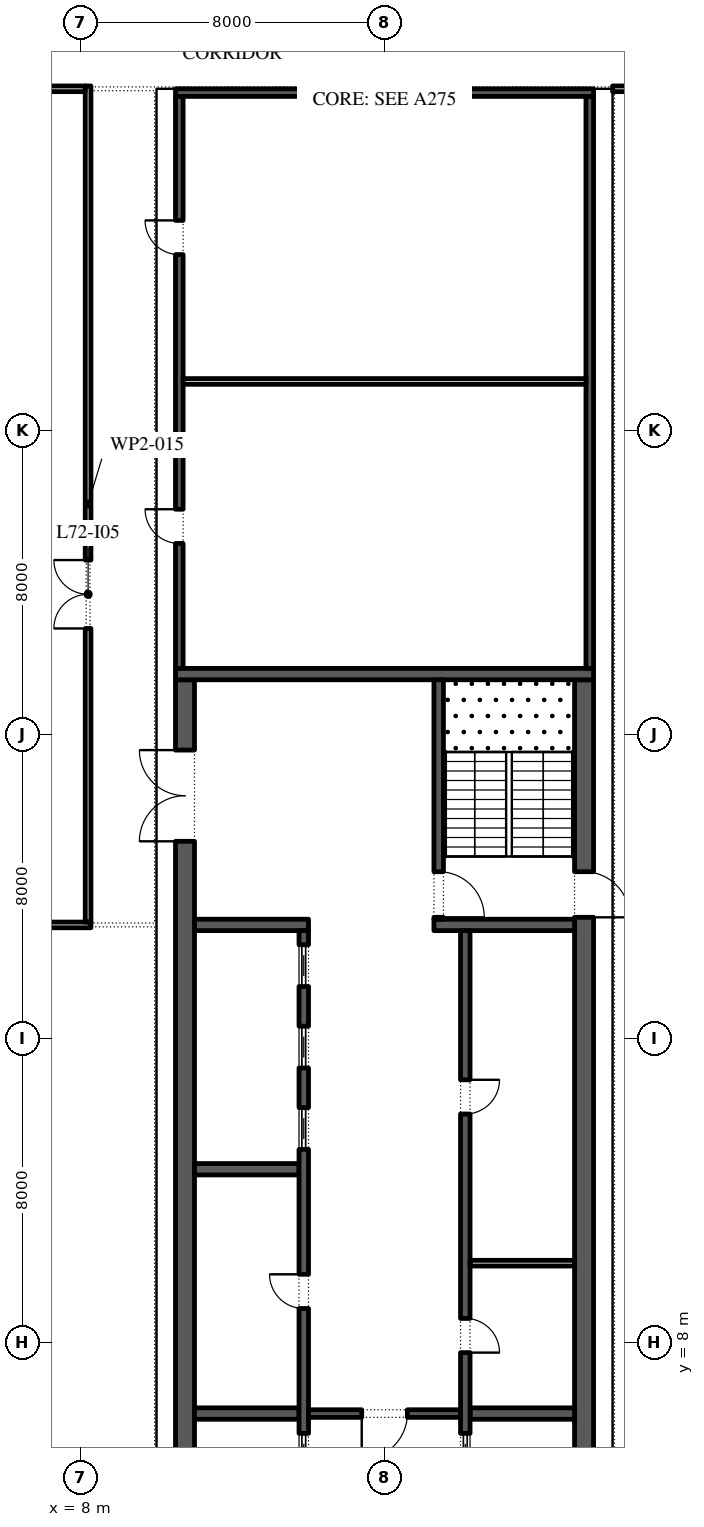
"""IFC4 building model, lengths in metres.
Left out: names, types, materials, properties, quantities, classifications, styles, units other than length and angle.
Written with IfcOpenShell. Run it as: python <this file> out.ifc"""

import sys

from ifc_helpers import new_model, si_unit, direction, frame, frame_2d, origin, place, context, subcontext, project, spatial, rectangle, extrude, element, fill, save


model = new_model("IFC4")
c1 = context("Model", 3, precision=1e-05, world=origin(), true_north=direction((0.0, 1.0)))
c2 = subcontext(c1, "Body", "Model", "MODEL_VIEW")
j1 = project(units=[si_unit("LENGTHUNIT", "METRE"), si_unit("PLANEANGLEUNIT", "RADIAN")], contexts=[c1])
p1 = place(None, origin())
s1 = spatial("IfcSite", under=j1, at=p1, CompositionType="ELEMENT")
p2 = place(p1, origin())
s2 = spatial("IfcBuilding", under=s1, at=p2, CompositionType="ELEMENT")
p3 = place(p2, frame((0.0, 0.0, 330.0)))
s3 = spatial("IfcBuildingStorey", under=s2, at=p3, CompositionType="ELEMENT", Elevation=330.0)
p4 = place(p3, frame((21.25, -2.45, 0.0), z_axis=(0.0, 0.0, 1.0), x_axis=(0.0, 1.0, 0.0)))
e1 = element("IfcWall", 1, at=p4, inside=s3, PredefinedType="SHEAR", context=c2, shape_type="SweptSolid", body=[
    extrude(rectangle(XDim=27.9, YDim=0.5, at=frame_2d((13.95, 0.0))), origin(), (0.0, 0.0, 1.0), 4.0),
])
p5 = place(p4, frame((5.05, 0.0, 0.0)))
e2 = element("IfcOpeningElement", 2, at=p5, cuts=e1, PredefinedType="OPENING", context=c2, shape_type="SweptSolid", body=[
    extrude(rectangle(XDim=1.2, YDim=2.1, at=frame_2d((0.6, 1.05))), frame((0.0, 0.26, 0.0), z_axis=(0.0, -1.0, 0.0), x_axis=(1.0, 0.0, 0.0)), (0.0, 0.0, 1.0), 0.52),
])
p6 = place(p4, frame((21.65, 0.0, 0.0)))
e3 = element("IfcOpeningElement", 3, at=p6, cuts=e1, PredefinedType="OPENING", context=c2, shape_type="SweptSolid", body=[
    extrude(rectangle(XDim=1.2, YDim=2.1, at=frame_2d((0.6, 1.05))), frame((0.0, 0.26, 0.0), z_axis=(0.0, -1.0, 0.0), x_axis=(1.0, 0.0, 0.0)), (0.0, 0.0, 1.0), 0.52),
])
p7 = place(p3, frame((10.75, -2.45, 0.0), z_axis=(0.0, 0.0, 1.0), x_axis=(0.0, 1.0, 0.0)))
e4 = element("IfcWall", 4, at=p7, inside=s3, PredefinedType="SHEAR", context=c2, shape_type="SweptSolid", body=[
    extrude(rectangle(XDim=27.9, YDim=0.5, at=frame_2d((13.95, 0.0))), origin(), (0.0, 0.0, 1.0), 4.0),
])
p8 = place(p7, frame((23.65, 0.0, 0.0)))
e5 = element("IfcOpeningElement", 5, at=p8, cuts=e4, PredefinedType="OPENING", context=c2, shape_type="SweptSolid", body=[
    extrude(rectangle(XDim=2.4, YDim=2.1, at=frame_2d((1.2, 1.05))), frame((0.0, 0.26, 0.0), z_axis=(0.0, -1.0, 0.0), x_axis=(1.0, 0.0, 0.0)), (0.0, 0.0, 1.0), 0.52),
])
p9 = place(p7, frame((1.087, 0.0, 0.0)))
e6 = element("IfcOpeningElement", 6, at=p9, cuts=e4, PredefinedType="OPENING", context=c2, shape_type="SweptSolid", body=[
    extrude(rectangle(XDim=0.9, YDim=2.1, at=frame_2d((0.45, 1.05))), frame((0.0, 0.26, 0.0), z_axis=(0.0, -1.0, 0.0), x_axis=(1.0, 0.0, 0.0)), (0.0, 0.0, 1.0), 0.52),
])
p10 = place(p7, frame((4.262, 0.0, 0.0)))
e7 = element("IfcOpeningElement", 7, at=p10, cuts=e4, PredefinedType="OPENING", context=c2, shape_type="SweptSolid", body=[
    extrude(rectangle(XDim=1.0, YDim=2.1, at=frame_2d((0.5, 1.05))), frame((0.0, 0.26, 0.0), z_axis=(0.0, -1.0, 0.0), x_axis=(1.0, 0.0, 0.0)), (0.0, 0.0, 1.0), 0.52),
])
p11 = place(p3, frame((10.5, 25.6, 0.0), z_axis=(0.0, 0.0, 1.0), x_axis=(1.0, 0.0, 0.0)))
e8 = element("IfcWall", 8, at=p11, inside=s3, PredefinedType="SHEAR", context=c2, shape_type="SweptSolid", body=[
    extrude(rectangle(XDim=11.0, YDim=0.3, at=frame_2d((5.5, 0.0))), origin(), (0.0, 0.0, 1.0), 4.0),
])
p12 = place(p3, frame((17.3, 19.0, 0.0), z_axis=(0.0, 0.0, 1.0), x_axis=(1.0, 0.0, 0.0)))
e9 = element("IfcWall", 9, at=p12, inside=s3, PredefinedType="SHEAR", context=c2, shape_type="SweptSolid", body=[
    extrude(rectangle(XDim=3.7, YDim=0.3, at=frame_2d((1.85, 0.0))), origin(), (0.0, 0.0, 1.0), 4.0),
])
p13 = place(p3, frame((17.425, 19.15, 0.0), z_axis=(0.0, 0.0, 1.0), x_axis=(0.0, 1.0, 0.0)))
e10 = element("IfcWall", 10, at=p13, inside=s3, PredefinedType="SHEAR", context=c2, shape_type="SweptSolid", body=[
    extrude(rectangle(XDim=6.3, YDim=0.25, at=frame_2d((3.15, 0.0))), origin(), (0.0, 0.0, 1.0), 4.0),
])
p14 = place(p13, frame((0.05, 0.0, 0.0)))
e11 = element("IfcOpeningElement", 11, at=p14, cuts=e10, PredefinedType="OPENING", context=c2, shape_type="SweptSolid", body=[
    extrude(rectangle(XDim=1.2, YDim=2.1, at=frame_2d((0.6, 1.05))), frame((0.0, 0.135, 0.0), z_axis=(0.0, -1.0, 0.0), x_axis=(1.0, 0.0, 0.0)), (0.0, 0.0, 1.0), 0.27),
])
p15 = place(p3, frame((18.25, 6.143, 0.0), z_axis=(0.0, 0.0, 1.0), x_axis=(1.0, 0.0, 0.0)))
e12 = element("IfcWall", 12, at=p15, inside=s3, PredefinedType="SHEAR", context=c2, shape_type="SweptSolid", body=[
    extrude(rectangle(XDim=2.75, YDim=0.3, at=frame_2d((1.375, 0.0))), origin(), (0.0, 0.0, 1.0), 4.0),
])
p16 = place(p3, frame((18.125, 4.15, 0.0), z_axis=(0.0, 0.0, 1.0), x_axis=(0.0, 1.0, 0.0)))
e13 = element("IfcWall", 13, at=p16, inside=s3, PredefinedType="SHEAR", context=c2, shape_type="SweptSolid", body=[
    extrude(rectangle(XDim=14.7, YDim=0.25, at=frame_2d((7.35, 0.0))), origin(), (0.0, 0.0, 1.0), 4.0),
])
p17 = place(p16, frame((3.596, 0.0, 0.0)))
e14 = element("IfcOpeningElement", 14, at=p17, cuts=e13, PredefinedType="OPENING", context=c2, shape_type="SweptSolid", body=[
    extrude(rectangle(XDim=0.9, YDim=2.1, at=frame_2d((0.45, 1.05))), frame((0.0, 0.135, 0.0), z_axis=(0.0, -1.0, 0.0), x_axis=(1.0, 0.0, 0.0)), (0.0, 0.0, 1.0), 0.27),
])
p18 = place(p16, frame((9.875, 0.0, 0.0)))
e15 = element("IfcOpeningElement", 15, at=p18, cuts=e13, PredefinedType="OPENING", context=c2, shape_type="SweptSolid", body=[
    extrude(rectangle(XDim=0.9, YDim=2.1, at=frame_2d((0.45, 1.05))), frame((0.0, 0.135, 0.0), z_axis=(0.0, -1.0, 0.0), x_axis=(1.0, 0.0, 0.0)), (0.0, 0.0, 1.0), 0.27),
])
p19 = place(p16, frame((0.371, 0.0, 0.0)))
e16 = element("IfcOpeningElement", 16, at=p19, cuts=e13, PredefinedType="OPENING", context=c2, shape_type="SweptSolid", body=[
    extrude(rectangle(XDim=1.1, YDim=2.1, at=frame_2d((0.55, 1.05))), frame((0.0, 0.135, 0.0), z_axis=(0.0, -1.0, 0.0), x_axis=(1.0, 0.0, 0.0)), (0.0, 0.0, 1.0), 0.27),
])
p20 = place(p3, frame((18.25, 10.1, 0.0), z_axis=(0.0, 0.0, 1.0), x_axis=(1.0, 0.0, 0.0)))
e17 = element("IfcWall", 17, at=p20, inside=s3, PredefinedType="PARTITIONING", context=c2, shape_type="SweptSolid", body=[
    extrude(rectangle(XDim=2.75, YDim=0.15, at=frame_2d((1.375, 0.0))), origin(), (0.0, 0.0, 1.0), 4.0),
])
for number, where, z_axis, x_axis in (
    (18, (11.0, 6.143, 0.0), (0.0, 0.0, 1.0), (1.0, 0.0, 0.0)),
    (19, (11.0, 12.571, 0.0), (0.0, 0.0, 1.0), (1.0, 0.0, 0.0)),
):
    element("IfcWall", number, at=place(p3, frame(where, z_axis=z_axis, x_axis=x_axis)), inside=s3, PredefinedType="SHEAR", context=c2, shape_type="SweptSolid", body=[
        extrude(rectangle(XDim=2.75, YDim=0.3, at=frame_2d((1.375, 0.0))), origin(), (0.0, 0.0, 1.0), 4.0),
    ])
p21 = place(p3, frame((11.0, 19.0, 0.0), z_axis=(0.0, 0.0, 1.0), x_axis=(1.0, 0.0, 0.0)))
e20 = element("IfcWall", 20, at=p21, inside=s3, PredefinedType="SHEAR", context=c2, shape_type="SweptSolid", body=[
    extrude(rectangle(XDim=3.0, YDim=0.3, at=frame_2d((1.5, 0.0))), origin(), (0.0, 0.0, 1.0), 4.0),
])
p22 = place(p3, frame((13.875, -2.45, 0.0), z_axis=(0.0, 0.0, 1.0), x_axis=(0.0, 1.0, 0.0)))
e21 = element("IfcWall", 21, at=p22, inside=s3, PredefinedType="SHEAR", context=c2, shape_type="SweptSolid", body=[
    extrude(rectangle(XDim=21.3, YDim=0.25, at=frame_2d((10.65, 0.0))), origin(), (0.0, 0.0, 1.0), 4.0),
])
p23 = place(p22, frame((11.357, 0.0, 0.0)))
e22 = element("IfcOpeningElement", 22, at=p23, cuts=e21, PredefinedType="OPENING", context=c2, shape_type="SweptSolid", body=[
    extrude(rectangle(XDim=0.9, YDim=2.1, at=frame_2d((0.45, 1.05))), frame((0.0, 0.135, 0.0), z_axis=(0.0, -1.0, 0.0), x_axis=(1.0, 0.0, 0.0)), (0.0, 0.0, 1.0), 0.27),
])
p24 = place(p22, frame((6.971, 0.0, 0.0)))
e23 = element("IfcOpeningElement", 23, at=p24, cuts=e21, PredefinedType="OPENING", context=c2, shape_type="SweptSolid", body=[
    extrude(rectangle(XDim=1.1, YDim=2.1, at=frame_2d((0.55, 1.05))), frame((0.0, 0.135, 0.0), z_axis=(0.0, -1.0, 0.0), x_axis=(1.0, 0.0, 0.0)), (0.0, 0.0, 1.0), 0.27),
])
p25 = place(p22, frame((15.543, 0.0, 0.0)))
e24 = element("IfcOpeningElement", 24, at=p25, cuts=e21, PredefinedType="OPENING", context=c2, shape_type="SweptSolid", body=[
    extrude(rectangle(XDim=1.1, YDim=2.1, at=frame_2d((0.55, 1.05))), frame((0.0, 0.135, 0.0), z_axis=(0.0, -1.0, 0.0), x_axis=(1.0, 0.0, 0.0)), (0.0, 0.0, 1.0), 0.27),
])
p26 = place(p22, frame((17.686, 0.0, 0.0)))
e25 = element("IfcOpeningElement", 25, at=p26, cuts=e21, PredefinedType="OPENING", context=c2, shape_type="SweptSolid", body=[
    extrude(rectangle(XDim=1.1, YDim=2.1, at=frame_2d((0.55, 1.05))), frame((0.0, 0.135, 0.0), z_axis=(0.0, -1.0, 0.0), x_axis=(1.0, 0.0, 0.0)), (0.0, 0.0, 1.0), 0.27),
])
p27 = place(p22, frame((19.829, 0.0, 0.0)))
e26 = element("IfcOpeningElement", 26, at=p27, cuts=e21, PredefinedType="OPENING", context=c2, shape_type="SweptSolid", body=[
    extrude(rectangle(XDim=1.1, YDim=2.1, at=frame_2d((0.55, 1.05))), frame((0.0, 0.135, 0.0), z_axis=(0.0, -1.0, 0.0), x_axis=(1.0, 0.0, 0.0)), (0.0, 0.0, 1.0), 0.27),
])
p28 = place(p3, frame((14.0, 6.143, 0.0), z_axis=(0.0, 0.0, 1.0), x_axis=(1.0, 0.0, 0.0)))
e27 = element("IfcWall", 27, at=p28, inside=s3, PredefinedType="SHEAR", context=c2, shape_type="SweptSolid", body=[
    extrude(rectangle(XDim=4.0, YDim=0.2, at=frame_2d((2.0, 0.0))), origin(), (0.0, 0.0, 1.0), 4.0),
])
p29 = place(p28, frame((1.4, 0.0, 0.0)))
e28 = element("IfcOpeningElement", 28, at=p29, cuts=e27, PredefinedType="OPENING", context=c2, shape_type="SweptSolid", body=[
    extrude(rectangle(XDim=1.2, YDim=2.1, at=frame_2d((0.6, 1.05))), frame((0.0, 0.11, 0.0), z_axis=(0.0, -1.0, 0.0), x_axis=(1.0, 0.0, 0.0)), (0.0, 0.0, 1.0), 0.22),
])
p30 = place(p3, frame((21.4, 25.75, 0.0), z_axis=(0.0, 0.0, 1.0), x_axis=(0.0, 1.0, 0.0)))
e29 = element("IfcWall", 29, at=p30, inside=s3, PredefinedType="SHEAR", context=c2, shape_type="SweptSolid", body=[
    extrude(rectangle(XDim=15.05, YDim=0.2, at=frame_2d((7.525, 0.0))), origin(), (0.0, 0.0, 1.0), 4.0),
])
p31 = place(p3, frame((10.6, 25.75, 0.0), z_axis=(0.0, 0.0, 1.0), x_axis=(0.0, 1.0, 0.0)))
e30 = element("IfcWall", 30, at=p31, inside=s3, PredefinedType="SHEAR", context=c2, shape_type="SweptSolid", body=[
    extrude(rectangle(XDim=15.05, YDim=0.2, at=frame_2d((7.525, 0.0))), origin(), (0.0, 0.0, 1.0), 4.0),
])
p32 = place(p31, frame((3.288, 0.0, 0.0)))
e31 = element("IfcOpeningElement", 31, at=p32, cuts=e30, PredefinedType="OPENING", context=c2, shape_type="SweptSolid", body=[
    extrude(rectangle(XDim=0.9, YDim=2.1, at=frame_2d((0.45, 1.05))), frame((0.0, 0.11, 0.0), z_axis=(0.0, -1.0, 0.0), x_axis=(1.0, 0.0, 0.0)), (0.0, 0.0, 1.0), 0.22),
])
p33 = place(p31, frame((10.887, 0.0, 0.0)))
e32 = element("IfcOpeningElement", 32, at=p33, cuts=e30, PredefinedType="OPENING", context=c2, shape_type="SweptSolid", body=[
    extrude(rectangle(XDim=0.9, YDim=2.1, at=frame_2d((0.45, 1.05))), frame((0.0, 0.11, 0.0), z_axis=(0.0, -1.0, 0.0), x_axis=(1.0, 0.0, 0.0)), (0.0, 0.0, 1.0), 0.22),
])
p34 = place(p3, frame((10.5, 40.9, 0.0), z_axis=(0.0, 0.0, 1.0), x_axis=(1.0, 0.0, 0.0)))
e33 = element("IfcWall", 33, at=p34, inside=s3, PredefinedType="SHEAR", context=c2, shape_type="SweptSolid", body=[
    extrude(rectangle(XDim=11.0, YDim=0.2, at=frame_2d((5.5, 0.0))), origin(), (0.0, 0.0, 1.0), 4.0),
])
p35 = place(p3, frame((10.7, 33.3, 0.0), z_axis=(0.0, 0.0, 1.0), x_axis=(1.0, 0.0, 0.0)))
e34 = element("IfcWall", 34, at=p35, inside=s3, PredefinedType="PARTITIONING", context=c2, shape_type="SweptSolid", body=[
    extrude(rectangle(XDim=10.6, YDim=0.15, at=frame_2d((5.3, 0.0))), origin(), (0.0, 0.0, 1.0), 4.0),
])
p36 = place(p3, frame((-2.5, 19.0, 0.0), z_axis=(0.0, 0.0, 1.0), x_axis=(1.0, 0.0, 0.0)))
e35 = element("IfcWall", 35, at=p36, inside=s3, PredefinedType="PARTITIONING", context=c2, shape_type="SweptSolid", body=[
    extrude(rectangle(XDim=10.775, YDim=0.15, at=frame_2d((5.387, 0.0))), origin(), (0.0, 0.0, 1.0), 4.0),
])
p37 = place(p3, frame((8.2, 19.075, 0.0), z_axis=(0.0, 0.0, 1.0), x_axis=(0.0, 1.0, 0.0)))
e36 = element("IfcWall", 36, at=p37, inside=s3, PredefinedType="PARTITIONING", context=c2, shape_type="SweptSolid", body=[
    extrude(rectangle(XDim=22.0, YDim=0.15, at=frame_2d((11.0, 0.0))), origin(), (0.0, 0.0, 1.0), 4.0),
])
p38 = place(p37, frame((7.725, 0.0, 0.0)))
e37 = element("IfcOpeningElement", 37, at=p38, cuts=e36, PredefinedType="OPENING", context=c2, shape_type="SweptSolid", body=[
    extrude(rectangle(XDim=1.8, YDim=2.1, at=frame_2d((0.9, 1.05))), frame((0.0, 0.085, 0.0), z_axis=(0.0, -1.0, 0.0), x_axis=(1.0, 0.0, 0.0)), (0.0, 0.0, 1.0), 0.17),
])
p39 = place(p3, frame((8.125, 41.0, 0.0), z_axis=(0.0, 0.0, 1.0), x_axis=(-1.0, 0.0, 0.0)))
e38 = element("IfcWall", 38, at=p39, inside=s3, PredefinedType="PARTITIONING", context=c2, shape_type="SweptSolid", body=[
    extrude(rectangle(XDim=10.575, YDim=0.15, at=frame_2d((5.288, 0.0))), origin(), (0.0, 0.0, 1.0), 4.0),
])
p40 = place(p3, frame((26.05, 41.0, 0.0), z_axis=(0.0, 0.0, 1.0), x_axis=(-1.0, 0.0, 0.0)))
e39 = element("IfcWall", 39, at=p40, inside=s3, PredefinedType="PARTITIONING", context=c2, shape_type="SweptSolid", body=[
    extrude(rectangle(XDim=4.05, YDim=0.15, at=frame_2d((2.025, 0.0))), origin(), (0.0, 0.0, 1.0), 4.0),
])
p41 = place(p40, frame((0.9, 0.0, 0.0)))
e40 = element("IfcOpeningElement", 40, at=p41, cuts=e39, PredefinedType="OPENING", context=c2, shape_type="SweptSolid", body=[
    extrude(rectangle(XDim=1.0, YDim=2.1, at=frame_2d((0.5, 1.05))), frame((0.0, 0.085, 0.0), z_axis=(0.0, -1.0, 0.0), x_axis=(1.0, 0.0, 0.0)), (0.0, 0.0, 1.0), 0.17),
])
p42 = place(p17, frame((0.9, -0.2, 0.0), z_axis=(0.0, 0.0, 1.0), x_axis=(-1.0, 0.0, 0.0)))
e41 = element("IfcDoor", 41, at=p42, inside=s3, OperationType="SINGLE_SWING_LEFT", PredefinedType="DOOR", context=c2, shape_type="SweptSolid", body=[
    extrude(rectangle(XDim=0.9, YDim=2.1, at=frame_2d((0.45, 1.05))), frame((0.0, -0.075, 0.0), z_axis=(0.0, -1.0, 0.0), x_axis=(1.0, 0.0, 0.0)), (0.0, 0.0, 1.0), 0.05),
])
fill(e14, e41)
p43 = place(p18, frame((0.9, -0.2, 0.0), z_axis=(0.0, 0.0, 1.0), x_axis=(-1.0, 0.0, 0.0)))
e42 = element("IfcDoor", 42, at=p43, inside=s3, OperationType="SINGLE_SWING_RIGHT", PredefinedType="DOOR", context=c2, shape_type="SweptSolid", body=[
    extrude(rectangle(XDim=0.9, YDim=2.1, at=frame_2d((0.45, 1.05))), frame((0.0, -0.075, 0.0), z_axis=(0.0, -1.0, 0.0), x_axis=(1.0, 0.0, 0.0)), (0.0, 0.0, 1.0), 0.05),
])
fill(e15, e42)
p44 = place(p19, origin())
e43 = element("IfcDoor", 43, at=p44, inside=s3, OperationType="SLIDING_TO_LEFT", PredefinedType="DOOR", context=c2, shape_type="SweptSolid", body=[
    extrude(rectangle(XDim=1.1, YDim=2.1, at=frame_2d((0.55, 1.05))), frame((0.0, 0.025, 0.0), z_axis=(0.0, -1.0, 0.0), x_axis=(1.0, 0.0, 0.0)), (0.0, 0.0, 1.0), 0.05),
])
fill(e16, e43)
p45 = place(p23, origin())
e44 = element("IfcDoor", 44, at=p45, inside=s3, OperationType="SINGLE_SWING_LEFT", PredefinedType="DOOR", context=c2, shape_type="SweptSolid", body=[
    extrude(rectangle(XDim=0.9, YDim=2.1, at=frame_2d((0.45, 1.05))), frame((0.0, 0.125, 0.0), z_axis=(0.0, -1.0, 0.0), x_axis=(1.0, 0.0, 0.0)), (0.0, 0.0, 1.0), 0.05),
])
fill(e22, e44)
p46 = place(p24, origin())
e45 = element("IfcDoor", 45, at=p46, inside=s3, OperationType="SLIDING_TO_LEFT", PredefinedType="DOOR", context=c2, shape_type="SweptSolid", body=[
    extrude(rectangle(XDim=1.1, YDim=2.1, at=frame_2d((0.55, 1.05))), frame((0.0, 0.025, 0.0), z_axis=(0.0, -1.0, 0.0), x_axis=(1.0, 0.0, 0.0)), (0.0, 0.0, 1.0), 0.05),
])
fill(e23, e45)
p47 = place(p25, origin())
e46 = element("IfcDoor", 46, at=p47, inside=s3, OperationType="SLIDING_TO_LEFT", PredefinedType="DOOR", context=c2, shape_type="SweptSolid", body=[
    extrude(rectangle(XDim=1.1, YDim=2.1, at=frame_2d((0.55, 1.05))), frame((0.0, 0.025, 0.0), z_axis=(0.0, -1.0, 0.0), x_axis=(1.0, 0.0, 0.0)), (0.0, 0.0, 1.0), 0.05),
])
fill(e24, e46)
p48 = place(p26, origin())
e47 = element("IfcDoor", 47, at=p48, inside=s3, OperationType="SLIDING_TO_LEFT", PredefinedType="DOOR", context=c2, shape_type="SweptSolid", body=[
    extrude(rectangle(XDim=1.1, YDim=2.1, at=frame_2d((0.55, 1.05))), frame((0.0, 0.025, 0.0), z_axis=(0.0, -1.0, 0.0), x_axis=(1.0, 0.0, 0.0)), (0.0, 0.0, 1.0), 0.05),
])
fill(e25, e47)
p49 = place(p27, origin())
e48 = element("IfcDoor", 48, at=p49, inside=s3, OperationType="SLIDING_TO_LEFT", PredefinedType="DOOR", context=c2, shape_type="SweptSolid", body=[
    extrude(rectangle(XDim=1.1, YDim=2.1, at=frame_2d((0.55, 1.05))), frame((0.0, 0.025, 0.0), z_axis=(0.0, -1.0, 0.0), x_axis=(1.0, 0.0, 0.0)), (0.0, 0.0, 1.0), 0.05),
])
fill(e26, e48)
p50 = place(p29, frame((1.2, 0.0, 0.0), z_axis=(0.0, 0.0, 1.0), x_axis=(-1.0, 0.0, 0.0)))
e49 = element("IfcDoor", 49, at=p50, inside=s3, OperationType="SINGLE_SWING_LEFT", PredefinedType="DOOR", context=c2, shape_type="SweptSolid", body=[
    extrude(rectangle(XDim=1.2, YDim=2.1, at=frame_2d((0.6, 1.05))), frame((0.0, 0.025, 0.0), z_axis=(0.0, -1.0, 0.0), x_axis=(1.0, 0.0, 0.0)), (0.0, 0.0, 1.0), 0.05),
])
fill(e28, e49)
p51 = place(p8, origin())
e50 = element("IfcDoor", 50, at=p51, inside=s3, OperationType="DOUBLE_DOOR_SINGLE_SWING", PredefinedType="DOOR", context=c2, shape_type="SweptSolid", body=[
    extrude(rectangle(XDim=2.4, YDim=2.1, at=frame_2d((1.2, 1.05))), frame((0.0, 0.025, 0.0), z_axis=(0.0, -1.0, 0.0), x_axis=(1.0, 0.0, 0.0)), (0.0, 0.0, 1.0), 0.05),
])
fill(e5, e50)
p52 = place(p14, frame((1.2, 0.0, 0.0), z_axis=(0.0, 0.0, 1.0), x_axis=(-1.0, 0.0, 0.0)))
e51 = element("IfcDoor", 51, at=p52, inside=s3, OperationType="SINGLE_SWING_LEFT", PredefinedType="DOOR", context=c2, shape_type="SweptSolid", body=[
    extrude(rectangle(XDim=1.2, YDim=2.1, at=frame_2d((0.6, 1.05))), frame((0.0, 0.025, 0.0), z_axis=(0.0, -1.0, 0.0), x_axis=(1.0, 0.0, 0.0)), (0.0, 0.0, 1.0), 0.05),
])
fill(e11, e51)
p53 = place(p6, frame((1.2, 0.0, 0.0), z_axis=(0.0, 0.0, 1.0), x_axis=(-1.0, 0.0, 0.0)))
e52 = element("IfcDoor", 52, at=p53, inside=s3, OperationType="SINGLE_SWING_LEFT", PredefinedType="DOOR", context=c2, shape_type="SweptSolid", body=[
    extrude(rectangle(XDim=1.2, YDim=2.1, at=frame_2d((0.6, 1.05))), frame((0.0, 0.025, 0.0), z_axis=(0.0, -1.0, 0.0), x_axis=(1.0, 0.0, 0.0)), (0.0, 0.0, 1.0), 0.05),
])
fill(e3, e52)
p54 = place(p32, origin())
e53 = element("IfcDoor", 53, at=p54, inside=s3, OperationType="SINGLE_SWING_LEFT", PredefinedType="DOOR", context=c2, shape_type="SweptSolid", body=[
    extrude(rectangle(XDim=0.9, YDim=2.1, at=frame_2d((0.45, 1.05))), frame((0.0, -0.05, 0.0), z_axis=(0.0, -1.0, 0.0), x_axis=(1.0, 0.0, 0.0)), (0.0, 0.0, 1.0), 0.05),
])
fill(e31, e53)
p55 = place(p33, origin())
e54 = element("IfcDoor", 54, at=p55, inside=s3, OperationType="SINGLE_SWING_LEFT", PredefinedType="DOOR", context=c2, shape_type="SweptSolid", body=[
    extrude(rectangle(XDim=0.9, YDim=2.1, at=frame_2d((0.45, 1.05))), frame((0.0, -0.05, 0.0), z_axis=(0.0, -1.0, 0.0), x_axis=(1.0, 0.0, 0.0)), (0.0, 0.0, 1.0), 0.05),
])
fill(e32, e54)
p56 = place(p38, origin())
e55 = element("IfcDoor", 55, at=p56, inside=s3, OperationType="SINGLE_SWING_RIGHT", PredefinedType="DOOR", context=c2, shape_type="SweptSolid", body=[
    extrude(rectangle(XDim=1.8, YDim=2.1, at=frame_2d((0.9, 1.05))), frame((0.0, 0.025, 0.0), z_axis=(0.0, -1.0, 0.0), x_axis=(1.0, 0.0, 0.0)), (0.0, 0.0, 1.0), 0.05),
])
fill(e37, e55)
save(model, sys.argv[1])
